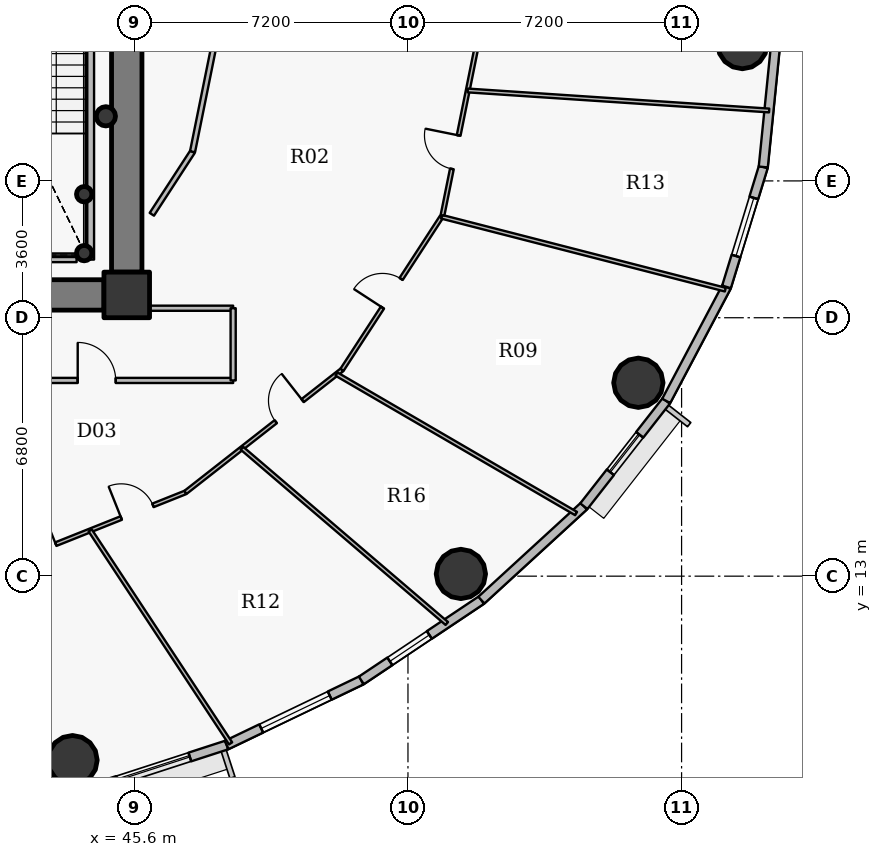
"""IFC4 building model, lengths in metres.
Left out: names, types, materials, properties, quantities, classifications, styles, units other than length and angle.
Written with IfcOpenShell. Run it as: python <this file> out.ifc"""

import sys

from ifc_helpers import new_model, si_unit, direction, frame, frame_2d, origin, origin_2d, place, context, subcontext, project, spatial, rectangle, hollow_circle, extrude, source, transform, mapped, element, fill, save


model = new_model("IFC4")
c1 = context("Model", 3, precision=1e-05, world=origin(), true_north=direction((0.0, 1.0)))
c2 = subcontext(c1, "Body", "Model", "MODEL_VIEW")
j1 = project(units=[si_unit("LENGTHUNIT", "METRE"), si_unit("PLANEANGLEUNIT", "RADIAN")], contexts=[c1])
p1 = place(None, origin())
s1 = spatial("IfcSite", under=j1, at=p1, CompositionType="ELEMENT")
p2 = place(p1, origin())
s2 = spatial("IfcBuilding", under=s1, at=p2, CompositionType="ELEMENT")
p3 = place(p2, frame((0.0, 0.0, 167.4)))
s3 = spatial("IfcBuildingStorey", under=s2, at=p3, CompositionType="ELEMENT", Elevation=167.4)
p4 = place(p3, frame((45.4, 20.4, 0.0), z_axis=(0.0, 0.0, 1.0), x_axis=(1.0, 0.0, 0.0)))
e1 = element("IfcColumn", 1, at=p4, inside=s3, PredefinedType="COLUMN", context=c2, shape_type="SweptSolid", body=[
    extrude(rectangle(XDim=1.2, YDim=1.2, at=origin_2d()), origin(), (0.0, 0.0, 1.0), 3.75),
])
for number, where, z_axis, x_axis in (
    (2, (44.28, 21.5, 0.0), (0.0, 0.0, 1.0), (1.0, 0.0, 0.0)),
    (3, (44.28, 23.05, 0.0), (0.0, 0.0, 1.0), (1.0, 0.0, 0.0)),
):
    element("IfcColumn", number, at=place(p3, frame(where, z_axis=z_axis, x_axis=x_axis)), inside=s3, PredefinedType="COLUMN", context=c2, shape_type="SweptSolid", body=[
        extrude(hollow_circle(Radius=0.203, WallThickness=0.016, at=origin_2d()), origin(), (0.0, 0.0, 1.0), 3.75),
    ])
p5 = place(p3, frame((45.4, 33.0, 0.0), z_axis=(0.0, 0.0, 1.0), x_axis=(0.0, -1.0, 0.0)))
e4 = element("IfcWall", 4, at=p5, inside=s3, PredefinedType="SHEAR", context=c2, shape_type="SweptSolid", body=[
    extrude(rectangle(XDim=12.0, YDim=0.8, at=frame_2d((6.0, 0.0))), origin(), (0.0, 0.0, 1.0), 2.95),
])
p6 = place(p3, frame((44.8, 20.4, 0.0), z_axis=(0.0, 0.0, 1.0), x_axis=(-1.0, 0.0, 0.0)))
e5 = element("IfcWall", 5, at=p6, inside=s3, PredefinedType="SHEAR", context=c2, shape_type="SweptSolid", body=[
    extrude(rectangle(XDim=17.6, YDim=0.8, at=frame_2d((8.8, 0.0))), origin(), (0.0, 0.0, 1.0), 2.95),
])
p7 = place(p6, frame((9.55, 0.0, 0.0)))
e6 = element("IfcOpeningElement", 6, at=p7, cuts=e5, PredefinedType="OPENING", context=c2, shape_type="SweptSolid", body=[
    extrude(rectangle(XDim=1.15, YDim=2.15, at=origin_2d()), frame((0.575, 0.41, 1.075), z_axis=(0.0, -1.0, 0.0), x_axis=(1.0, 0.0, 0.0)), (0.0, 0.0, 1.0), 0.82),
])
for number, where, z_axis, x_axis in (
    (7, (61.6, 27.0, 0.0), (0.0, 0.0, 1.0), (1.0, 0.0, 0.0)),
    (8, (43.973, 8.159, 0.0), (0.0, 0.0, 1.0), (1.0, 0.0, 0.0)),
    (9, (54.192, 13.058, 0.0), (0.0, 0.0, 1.0), (1.0, 0.0, 0.0)),
    (10, (58.863, 18.089, 0.0), (0.0, 0.0, 1.0), (1.0, 0.0, 0.0)),
):
    element("IfcColumn", number, at=place(p3, frame(where, z_axis=z_axis, x_axis=x_axis)), inside=s3, PredefinedType="COLUMN", context=c2, shape_type="SweptSolid", body=[
        extrude(hollow_circle(Radius=0.65, WallThickness=0.04, at=origin_2d()), origin(), (0.0, 0.0, 1.0), 3.75),
    ])
p8 = place(p3, frame((44.85, 25.1, 0.0), z_axis=(0.0, 0.0, 1.0), x_axis=(1.0, 0.0, 0.0)))
e11 = element("IfcColumn", 11, at=p8, inside=s3, PredefinedType="COLUMN", context=c2, shape_type="SweptSolid", body=[
    extrude(hollow_circle(Radius=0.254, WallThickness=0.02, at=origin_2d()), origin(), (0.0, 0.0, 1.0), 3.75),
])
p9 = place(p3, frame((48.03, 8.556, 0.0), z_axis=(0.0, 0.0, 1.0), x_axis=(-0.951209870236, -0.30854462038, 0.0)))
e12 = element("IfcWall", 12, at=p9, inside=s3, PredefinedType="SOLIDWALL", context=c2, shape_type="SweptSolid", body=[
    extrude(rectangle(XDim=4.038, YDim=0.24, at=frame_2d((2.019, 0.0))), origin(), (0.0, 0.0, 1.0), 3.5),
])
p10 = place(p9, frame((1.019, 0.0, 0.9)))
e13 = element("IfcOpeningElement", 13, at=p10, cuts=e12, PredefinedType="OPENING", context=c2, shape_type="SweptSolid", body=[
    extrude(rectangle(XDim=2.0, YDim=1.75, at=origin_2d()), frame((1.0, 0.13, 0.875), z_axis=(0.0, -1.0, 0.0), x_axis=(1.0, 0.0, 0.0)), (0.0, 0.0, 1.0), 0.26),
])
p11 = place(p3, frame((51.573, 10.257, 0.0), z_axis=(0.0, 0.0, 1.0), x_axis=(-0.901564733809, -0.432644231155, 0.0)))
e14 = element("IfcWall", 14, at=p11, inside=s3, PredefinedType="SOLIDWALL", context=c2, shape_type="SweptSolid", body=[
    extrude(rectangle(XDim=3.93, YDim=0.24, at=frame_2d((1.965, 0.0))), origin(), (0.0, 0.0, 1.0), 3.5),
])
p12 = place(p11, frame((0.923, 0.0, 0.9)))
e15 = element("IfcOpeningElement", 15, at=p12, cuts=e14, PredefinedType="OPENING", context=c2, shape_type="SweptSolid", body=[
    extrude(rectangle(XDim=2.0, YDim=1.75, at=origin_2d()), frame((1.0, 0.13, 0.875), z_axis=(0.0, -1.0, 0.0), x_axis=(1.0, 0.0, 0.0)), (0.0, 0.0, 1.0), 0.26),
])
p13 = place(p3, frame((54.732, 12.369, 0.0), z_axis=(0.0, 0.0, 1.0), x_axis=(-0.831228998277, -0.555930168657, 0.0)))
e16 = element("IfcWall", 16, at=p13, inside=s3, PredefinedType="SOLIDWALL", context=c2, shape_type="SweptSolid", body=[
    extrude(rectangle(XDim=3.8, YDim=0.24, at=frame_2d((1.9, 0.0))), origin(), (0.0, 0.0, 1.0), 3.5),
])
p14 = place(p13, frame((1.648, 0.0, 0.9)))
e17 = element("IfcOpeningElement", 17, at=p14, cuts=e16, PredefinedType="OPENING", context=c2, shape_type="SweptSolid", body=[
    extrude(rectangle(XDim=1.25, YDim=1.65, at=origin_2d()), frame((0.625, 0.13, 0.825), z_axis=(0.0, -1.0, 0.0), x_axis=(1.0, 0.0, 0.0)), (0.0, 0.0, 1.0), 0.26),
])
p15 = place(p3, frame((57.428, 14.842, 0.0), z_axis=(0.0, 0.0, 1.0), x_axis=(-0.737076565834, -0.675809245349, 0.0)))
e18 = element("IfcWall", 18, at=p15, inside=s3, PredefinedType="SOLIDWALL", context=c2, shape_type="SweptSolid", body=[
    extrude(rectangle(XDim=3.658, YDim=0.24, at=frame_2d((1.829, 0.0))), origin(), (0.0, 0.0, 1.0), 3.5),
])
p16 = place(p3, frame((59.596, 17.612, 0.0), z_axis=(0.0, 0.0, 1.0), x_axis=(-0.616287674549, -0.787521112224, 0.0)))
e19 = element("IfcWall", 19, at=p16, inside=s3, PredefinedType="SOLIDWALL", context=c2, shape_type="SweptSolid", body=[
    extrude(rectangle(XDim=3.517, YDim=0.24, at=frame_2d((1.759, 0.0))), origin(), (0.0, 0.0, 1.0), 3.5),
])
p17 = place(p16, frame((1.134, 0.0, 0.9)))
e20 = element("IfcOpeningElement", 20, at=p17, cuts=e19, PredefinedType="OPENING", context=c2, shape_type="SweptSolid", body=[
    extrude(rectangle(XDim=1.25, YDim=1.65, at=origin_2d()), frame((0.625, 0.13, 0.825), z_axis=(0.0, -1.0, 0.0), x_axis=(1.0, 0.0, 0.0)), (0.0, 0.0, 1.0), 0.26),
])
p18 = place(p3, frame((61.183, 20.611, 0.0), z_axis=(0.0, 0.0, 1.0), x_axis=(-0.467586874938, -0.88394712194, 0.0)))
e21 = element("IfcWall", 21, at=p18, inside=s3, PredefinedType="SOLIDWALL", context=c2, shape_type="SweptSolid", body=[
    extrude(rectangle(XDim=3.393, YDim=0.24, at=frame_2d((1.697, 0.0))), origin(), (0.0, 0.0, 1.0), 3.5),
])
p19 = place(p3, frame((62.15, 23.766, 0.0), z_axis=(0.0, 0.0, 1.0), x_axis=(-0.293097995113, -0.956082405058, 0.0)))
e22 = element("IfcWall", 22, at=p19, inside=s3, PredefinedType="SOLIDWALL", context=c2, shape_type="SweptSolid", body=[
    extrude(rectangle(XDim=3.3, YDim=0.24, at=frame_2d((1.65, 0.0))), origin(), (0.0, 0.0, 1.0), 3.5),
])
p20 = place(p19, frame((0.85, 0.0, 0.9)))
e23 = element("IfcOpeningElement", 23, at=p20, cuts=e22, PredefinedType="OPENING", context=c2, shape_type="SweptSolid", body=[
    extrude(rectangle(XDim=1.6, YDim=1.75, at=origin_2d()), frame((0.8, 0.13, 0.875), z_axis=(0.0, -1.0, 0.0), x_axis=(1.0, 0.0, 0.0)), (0.0, 0.0, 1.0), 0.26),
])
p21 = place(p3, frame((62.475, 27.0, 0.0), z_axis=(0.0, 0.0, 1.0), x_axis=(-0.100061534614, -0.994981250723, 0.0)))
e24 = element("IfcWall", 24, at=p21, inside=s3, PredefinedType="SOLIDWALL", context=c2, shape_type="SweptSolid", body=[
    extrude(rectangle(XDim=3.25, YDim=0.24, at=frame_2d((1.625, 0.0))), origin(), (0.0, 0.0, 1.0), 3.5),
])
p22 = place(p3, frame((38.541, 18.15, 0.0), z_axis=(0.0, 0.0, 1.0), x_axis=(1.0, 0.0, 0.0)))
e25 = element("IfcWall", 25, at=p22, inside=s3, PredefinedType="PARTITIONING", context=c2, shape_type="SweptSolid", body=[
    extrude(rectangle(XDim=9.659, YDim=0.135, at=frame_2d((4.829, 0.0))), origin(), (0.0, 0.0, 1.0), 2.935),
])
p23 = place(p22, frame((5.568, 0.0, 0.0)))
e26 = element("IfcOpeningElement", 26, at=p23, cuts=e25, PredefinedType="OPENING", context=c2, shape_type="SweptSolid", body=[
    extrude(rectangle(XDim=1.0, YDim=2.15, at=origin_2d()), frame((0.5, 0.078, 1.075), z_axis=(0.0, -1.0, 0.0), x_axis=(1.0, 0.0, 0.0)), (0.0, 0.0, 1.0), 0.155),
])
p24 = place(p3, frame((41.754, 13.133, 0.0), z_axis=(0.0, 0.0, 1.0), x_axis=(0.928798710424, 0.370584613166, 0.0)))
e27 = element("IfcWall", 27, at=p24, inside=s3, PredefinedType="PARTITIONING", context=c2, shape_type="SweptSolid", body=[
    extrude(rectangle(XDim=5.589, YDim=0.1, at=frame_2d((2.794, 0.0))), origin(), (0.0, 0.0, 1.0), 2.935),
])
p25 = place(p24, frame((1.015, 0.0, 0.0)))
e28 = element("IfcOpeningElement", 28, at=p25, cuts=e27, PredefinedType="OPENING", context=c2, shape_type="SweptSolid", body=[
    extrude(rectangle(XDim=0.9, YDim=2.1, at=origin_2d()), frame((0.45, 0.06, 1.05), z_axis=(0.0, -1.0, 0.0), x_axis=(1.0, 0.0, 0.0)), (0.0, 0.0, 1.0), 0.12),
])
p26 = place(p24, frame((3.769, 0.0, 0.0)))
e29 = element("IfcOpeningElement", 29, at=p26, cuts=e27, PredefinedType="OPENING", context=c2, shape_type="SweptSolid", body=[
    extrude(rectangle(XDim=0.9, YDim=2.1, at=origin_2d()), frame((0.45, 0.06, 1.05), z_axis=(0.0, -1.0, 0.0), x_axis=(1.0, 0.0, 0.0)), (0.0, 0.0, 1.0), 0.12),
])
p27 = place(p3, frame((44.438, 14.204, 0.0), z_axis=(0.0, 0.0, 1.0), x_axis=(0.550479331571, -0.834848792006, 0.0)))
e30 = element("IfcWall", 30, at=p27, inside=s3, PredefinedType="PARTITIONING", context=c2, shape_type="SweptSolid", body=[
    extrude(rectangle(XDim=6.712, YDim=0.1, at=frame_2d((3.356, 0.0))), origin(), (0.0, 0.0, 1.0), 2.935),
])
p28 = place(p3, frame((44.44, 21.33, 0.0), z_axis=(0.0, 0.0, 1.0), x_axis=(0.0, 1.0, 0.0)))
e31 = element("IfcWall", 31, at=p28, inside=s3, PredefinedType="PARTITIONING", context=c2, shape_type="SweptSolid", body=[
    extrude(rectangle(XDim=8.52, YDim=0.2, at=frame_2d((4.26, 0.0))), origin(), (0.0, 0.0, 1.0), 3.5),
])
p29 = place(p3, frame((45.8, 20.05, 0.0), z_axis=(0.0, 0.0, 1.0), x_axis=(1.0, 0.0, 0.0)))
e32 = element("IfcWall", 32, at=p29, inside=s3, PredefinedType="PARTITIONING", context=c2, shape_type="SweptSolid", body=[
    extrude(rectangle(XDim=2.4, YDim=0.135, at=frame_2d((1.2, 0.0))), origin(), (0.0, 0.0, 1.0), 3.5),
])
p30 = place(p3, frame((46.945, 15.204, 0.0), z_axis=(0.0, 0.0, 1.0), x_axis=(0.787300155222, 0.616569919463, 0.0)))
e33 = element("IfcWall", 33, at=p30, inside=s3, PredefinedType="PARTITIONING", context=c2, shape_type="SweptSolid", body=[
    extrude(rectangle(XDim=5.232, YDim=0.1, at=frame_2d((2.616, 0.0))), origin(), (0.0, 0.0, 1.0), 2.935),
])
p31 = place(p30, frame((3.018, 0.0, 0.0)))
e34 = element("IfcOpeningElement", 34, at=p31, cuts=e33, PredefinedType="OPENING", context=c2, shape_type="SweptSolid", body=[
    extrude(rectangle(XDim=0.9, YDim=2.1, at=origin_2d()), frame((0.45, 0.06, 1.05), z_axis=(0.0, -1.0, 0.0), x_axis=(1.0, 0.0, 0.0)), (0.0, 0.0, 1.0), 0.12),
])
p32 = place(p3, frame((48.2, 18.15, 0.0), z_axis=(0.0, 0.0, 1.0), x_axis=(0.0, 1.0, 0.0)))
e35 = element("IfcWall", 35, at=p32, inside=s3, PredefinedType="PARTITIONING", context=c2, shape_type="SweptSolid", body=[
    extrude(rectangle(XDim=1.9, YDim=0.135, at=frame_2d((0.95, 0.0))), origin(), (0.0, 0.0, 1.0), 3.5),
])
p33 = place(p3, frame((48.43, 16.367, 0.0), z_axis=(0.0, 0.0, 1.0), x_axis=(0.759902290403, -0.650037313575, 0.0)))
e36 = element("IfcWall", 36, at=p33, inside=s3, PredefinedType="PARTITIONING", context=c2, shape_type="SweptSolid", body=[
    extrude(rectangle(XDim=7.095, YDim=0.1, at=frame_2d((3.548, 0.0))), origin(), (0.0, 0.0, 1.0), 2.935),
])
p34 = place(p3, frame((50.92, 18.317, 0.0), z_axis=(0.0, 0.0, 1.0), x_axis=(0.864271351568, -0.50302587494, 0.0)))
e37 = element("IfcWall", 37, at=p34, inside=s3, PredefinedType="PARTITIONING", context=c2, shape_type="SweptSolid", body=[
    extrude(rectangle(XDim=7.294, YDim=0.1, at=frame_2d((3.647, 0.0))), origin(), (0.0, 0.0, 1.0), 2.935),
])
p35 = place(p3, frame((51.064, 18.429, 0.0), z_axis=(0.0, 0.0, 1.0), x_axis=(0.545379401359, 0.838189303542, 0.0)))
e38 = element("IfcWall", 38, at=p35, inside=s3, PredefinedType="PARTITIONING", context=c2, shape_type="SweptSolid", body=[
    extrude(rectangle(XDim=4.805, YDim=0.1, at=frame_2d((2.403, 0.0))), origin(), (0.0, 0.0, 1.0), 2.935),
])
p36 = place(p35, frame((1.953, 0.0, 0.0)))
e39 = element("IfcOpeningElement", 39, at=p36, cuts=e38, PredefinedType="OPENING", context=c2, shape_type="SweptSolid", body=[
    extrude(rectangle(XDim=0.9, YDim=2.1, at=origin_2d()), frame((0.45, 0.06, 1.05), z_axis=(0.0, -1.0, 0.0), x_axis=(1.0, 0.0, 0.0)), (0.0, 0.0, 1.0), 0.12),
])
p37 = place(p3, frame((53.685, 22.457, 0.0), z_axis=(0.0, 0.0, 1.0), x_axis=(0.968557288856, -0.248790631261, 0.0)))
e40 = element("IfcWall", 40, at=p37, inside=s3, PredefinedType="PARTITIONING", context=c2, shape_type="SweptSolid", body=[
    extrude(rectangle(XDim=7.708, YDim=0.1, at=frame_2d((3.854, 0.0))), origin(), (0.0, 0.0, 1.0), 2.935),
])
p38 = place(p3, frame((53.709, 22.494, 0.0), z_axis=(0.0, 0.0, 1.0), x_axis=(0.198209478932, 0.980159682124, 0.0)))
e41 = element("IfcWall", 41, at=p38, inside=s3, PredefinedType="PARTITIONING", context=c2, shape_type="SweptSolid", body=[
    extrude(rectangle(XDim=4.597, YDim=0.1, at=frame_2d((2.298, 0.0))), origin(), (0.0, 0.0, 1.0), 2.935),
])
p39 = place(p38, frame((1.246, 0.0, 0.0)))
e42 = element("IfcOpeningElement", 42, at=p39, cuts=e41, PredefinedType="OPENING", context=c2, shape_type="SweptSolid", body=[
    extrude(rectangle(XDim=0.9, YDim=2.1, at=origin_2d()), frame((0.45, 0.06, 1.05), z_axis=(0.0, -1.0, 0.0), x_axis=(1.0, 0.0, 0.0)), (0.0, 0.0, 1.0), 0.12),
])
p40 = place(p3, frame((54.373, 25.78, 0.0), z_axis=(0.0, 0.0, 1.0), x_axis=(0.997802925864, -0.066251951951, 0.0)))
e43 = element("IfcWall", 43, at=p40, inside=s3, PredefinedType="PARTITIONING", context=c2, shape_type="SweptSolid", body=[
    extrude(rectangle(XDim=7.949, YDim=0.1, at=frame_2d((3.974, 0.0))), origin(), (0.0, 0.0, 1.0), 2.935),
])
p41 = place(p3, frame((44.08, 21.33, 0.0), z_axis=(0.0, 0.0, 1.0), x_axis=(-1.0, 0.0, 0.0)))
e44 = element("IfcWall", 44, at=p41, inside=s3, PredefinedType="PARTITIONING", context=c2, shape_type="SweptSolid", body=[
    extrude(rectangle(XDim=2.82, YDim=0.135, at=frame_2d((1.41, 0.0))), origin(), (0.0, 0.0, 1.0), 3.035),
])
p42 = place(p3, frame((44.81, 20.0, 0.0), z_axis=(0.0, 0.0, 1.0), x_axis=(1.0, 0.0, 0.0)))
e45 = element("IfcWall", 45, at=p42, inside=s3, PredefinedType="PARTITIONING", context=c2, shape_type="SweptSolid", body=[
    extrude(rectangle(XDim=0.98, YDim=0.135, at=frame_2d((0.49, 0.0))), origin(), (0.0, 0.0, 1.0), 2.935),
])
p43 = place(p3, frame((45.8, 20.377, 0.0), z_axis=(0.0, 0.0, 1.0), x_axis=(0.0, 1.0, 0.0)))
e46 = element("IfcWall", 46, at=p43, inside=s3, PredefinedType="PARTITIONING", context=c2, shape_type="SweptSolid", body=[
    extrude(rectangle(XDim=0.613, YDim=0.135, at=frame_2d((0.306, 0.0))), origin(), (0.0, 0.0, 1.0), 3.5),
])
p44 = place(p3, frame((46.06, 22.521, 0.0), z_axis=(0.0, 0.0, 1.0), x_axis=(0.545342221334, 0.838213494064, 0.0)))
e47 = element("IfcWall", 47, at=p44, inside=s3, PredefinedType="PARTITIONING", context=c2, shape_type="SweptSolid", body=[
    extrude(rectangle(XDim=1.964, YDim=0.135, at=frame_2d((0.982, 0.0))), origin(), (0.0, 0.0, 1.0), 2.935),
])
p45 = place(p3, frame((47.131, 24.168, 0.0), z_axis=(0.0, 0.0, 1.0), x_axis=(0.198292837027, 0.980142821625, 0.0)))
e48 = element("IfcWall", 48, at=p45, inside=s3, PredefinedType="PARTITIONING", context=c2, shape_type="SweptSolid", body=[
    extrude(rectangle(XDim=2.89, YDim=0.135, at=frame_2d((1.445, 0.0))), origin(), (0.0, 0.0, 1.0), 2.935),
])
m1 = source(origin(), c2, "Body", "SweptSolid", [
    extrude(rectangle(XDim=2.0, YDim=1.75, at=origin_2d()), frame((1.0, 0.03, 0.875), z_axis=(0.0, -1.0, 0.0), x_axis=(1.0, 0.0, 0.0)), (0.0, 0.0, 1.0), 0.06),
])
p46 = place(p10, origin())
e49 = element("IfcWindow", 49, at=p46, inside=s3, PartitioningType="DOUBLE_PANEL_VERTICAL", PredefinedType="WINDOW", context=c2, shape_type="MappedRepresentation", body=[
    mapped(m1, transform((0.0, 0.0, 0.0), x_axis=(1.0, 0.0, 0.0), y_axis=(0.0, 1.0, 0.0), z_axis=(0.0, 0.0, 1.0), scale=1.0)),
])
fill(e13, e49)
p47 = place(p12, origin())
e50 = element("IfcWindow", 50, at=p47, inside=s3, PartitioningType="DOUBLE_PANEL_VERTICAL", PredefinedType="WINDOW", context=c2, shape_type="MappedRepresentation", body=[
    mapped(m1, transform((0.0, 0.0, 0.0), x_axis=(1.0, 0.0, 0.0), y_axis=(0.0, 1.0, 0.0), z_axis=(0.0, 0.0, 1.0), scale=1.0)),
])
fill(e15, e50)
m2 = source(origin(), c2, "Body", "SweptSolid", [
    extrude(rectangle(XDim=1.25, YDim=1.65, at=origin_2d()), frame((0.625, 0.03, 0.825), z_axis=(0.0, -1.0, 0.0), x_axis=(1.0, 0.0, 0.0)), (0.0, 0.0, 1.0), 0.06),
])
p48 = place(p14, origin())
e51 = element("IfcWindow", 51, at=p48, inside=s3, PartitioningType="SINGLE_PANEL", PredefinedType="WINDOW", context=c2, shape_type="MappedRepresentation", body=[
    mapped(m2, transform((0.0, 0.0, 0.0), x_axis=(1.0, 0.0, 0.0), y_axis=(0.0, 1.0, 0.0), z_axis=(0.0, 0.0, 1.0), scale=1.0)),
])
fill(e17, e51)
m3 = source(origin(), c2, "Body", "SweptSolid", [
    extrude(rectangle(XDim=1.6, YDim=1.75, at=origin_2d()), frame((0.8, 0.03, 0.875), z_axis=(0.0, -1.0, 0.0), x_axis=(1.0, 0.0, 0.0)), (0.0, 0.0, 1.0), 0.06),
])
p49 = place(p20, origin())
e52 = element("IfcWindow", 52, at=p49, inside=s3, PartitioningType="DOUBLE_PANEL_VERTICAL", PredefinedType="WINDOW", context=c2, shape_type="MappedRepresentation", body=[
    mapped(m3, transform((0.0, 0.0, 0.0), x_axis=(1.0, 0.0, 0.0), y_axis=(0.0, 1.0, 0.0), z_axis=(0.0, 0.0, 1.0), scale=1.0)),
])
fill(e23, e52)
p50 = place(p17, origin())
e53 = element("IfcWindow", 53, at=p50, inside=s3, PartitioningType="SINGLE_PANEL", PredefinedType="WINDOW", context=c2, shape_type="MappedRepresentation", body=[
    mapped(m2, transform((0.0, 0.0, 0.0), x_axis=(1.0, 0.0, 0.0), y_axis=(0.0, 1.0, 0.0), z_axis=(0.0, 0.0, 1.0), scale=1.0)),
])
fill(e20, e53)
m4 = source(origin(), c2, "Body", "SweptSolid", [
    extrude(rectangle(XDim=1.0, YDim=2.15, at=origin_2d()), frame((0.5, 0.025, 1.075), z_axis=(0.0, -1.0, 0.0), x_axis=(1.0, 0.0, 0.0)), (0.0, 0.0, 1.0), 0.05),
])
p51 = place(p23, origin())
e54 = element("IfcDoor", 54, at=p51, inside=s3, OperationType="SINGLE_SWING_LEFT", PredefinedType="DOOR", context=c2, shape_type="MappedRepresentation", body=[
    mapped(m4, transform((0.0, 0.0, 0.0), x_axis=(1.0, 0.0, 0.0), y_axis=(0.0, 1.0, 0.0), z_axis=(0.0, 0.0, 1.0), scale=1.0)),
])
fill(e26, e54)
m5 = source(origin(), c2, "Body", "SweptSolid", [
    extrude(rectangle(XDim=0.9, YDim=2.1, at=origin_2d()), frame((0.45, 0.025, 1.05), z_axis=(0.0, -1.0, 0.0), x_axis=(1.0, 0.0, 0.0)), (0.0, 0.0, 1.0), 0.05),
])
p52 = place(p25, origin())
e55 = element("IfcDoor", 55, at=p52, inside=s3, OperationType="SINGLE_SWING_RIGHT", PredefinedType="DOOR", context=c2, shape_type="MappedRepresentation", body=[
    mapped(m5, transform((0.0, 0.0, 0.0), x_axis=(1.0, 0.0, 0.0), y_axis=(0.0, 1.0, 0.0), z_axis=(0.0, 0.0, 1.0), scale=1.0)),
])
fill(e28, e55)
p53 = place(p26, origin())
e56 = element("IfcDoor", 56, at=p53, inside=s3, OperationType="SINGLE_SWING_LEFT", PredefinedType="DOOR", context=c2, shape_type="MappedRepresentation", body=[
    mapped(m5, transform((0.0, 0.0, 0.0), x_axis=(1.0, 0.0, 0.0), y_axis=(0.0, 1.0, 0.0), z_axis=(0.0, 0.0, 1.0), scale=1.0)),
])
fill(e29, e56)
p54 = place(p31, origin())
e57 = element("IfcDoor", 57, at=p54, inside=s3, OperationType="SINGLE_SWING_RIGHT", PredefinedType="DOOR", context=c2, shape_type="MappedRepresentation", body=[
    mapped(m5, transform((0.0, 0.0, 0.0), x_axis=(1.0, 0.0, 0.0), y_axis=(0.0, 1.0, 0.0), z_axis=(0.0, 0.0, 1.0), scale=1.0)),
])
fill(e34, e57)
p55 = place(p36, origin())
e58 = element("IfcDoor", 58, at=p55, inside=s3, OperationType="SINGLE_SWING_LEFT", PredefinedType="DOOR", context=c2, shape_type="MappedRepresentation", body=[
    mapped(m5, transform((0.0, 0.0, 0.0), x_axis=(1.0, 0.0, 0.0), y_axis=(0.0, 1.0, 0.0), z_axis=(0.0, 0.0, 1.0), scale=1.0)),
])
fill(e39, e58)
p56 = place(p39, origin())
e59 = element("IfcDoor", 59, at=p56, inside=s3, OperationType="SINGLE_SWING_RIGHT", PredefinedType="DOOR", context=c2, shape_type="MappedRepresentation", body=[
    mapped(m5, transform((0.0, 0.0, 0.0), x_axis=(1.0, 0.0, 0.0), y_axis=(0.0, 1.0, 0.0), z_axis=(0.0, 0.0, 1.0), scale=1.0)),
])
fill(e42, e59)
save(model, sys.argv[1])
